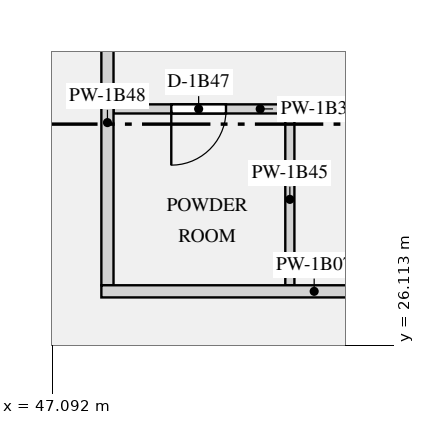
"""IFC4 building model, lengths in metres.
Left out: names, types, materials, properties, quantities, classifications, styles, units other than length and angle.
Written with IfcOpenShell. Run it as: python <this file> out.ifc"""

import sys

from ifc_helpers import new_model, si_unit, direction, frame, frame_2d, origin, place, context, subcontext, project, spatial, rectangle, extrude, element, fill, save


model = new_model("IFC4")
c1 = context("Model", 3, precision=1e-05, world=origin(), true_north=direction((0.0, 1.0)))
c2 = subcontext(c1, "Body", "Model", "MODEL_VIEW")
j1 = project(units=[si_unit("LENGTHUNIT", "METRE"), si_unit("PLANEANGLEUNIT", "RADIAN")], contexts=[c1])
p1 = place(None, origin())
s1 = spatial("IfcSite", under=j1, at=p1, CompositionType="ELEMENT")
p2 = place(p1, origin())
s2 = spatial("IfcBuilding", under=s1, at=p2, CompositionType="ELEMENT")
p3 = place(p2, frame((0.0, 0.0, 28.95)))
s3 = spatial("IfcBuildingStorey", under=s2, at=p3, CompositionType="ELEMENT", Elevation=28.95)
p4 = place(p3, frame((47.9, 27.0, 0.0), z_axis=(0.0, 0.0, 1.0), x_axis=(1.0, 0.0, 0.0)))
e1 = element("IfcWall", 1, at=p4, inside=s3, PredefinedType="PARTITIONING", context=c2, shape_type="SweptSolid", body=[
    extrude(rectangle(XDim=7.0, YDim=0.2, at=frame_2d((3.5, 0.0))), origin(), (0.0, 0.0, 1.0), 2.83),
])
p5 = place(p3, frame((48.1, 30.0, 0.0), z_axis=(0.0, 0.0, 1.0), x_axis=(1.0, 0.0, 0.0)))
e2 = element("IfcWall", 2, at=p5, inside=s3, PredefinedType="PARTITIONING", context=c2, shape_type="SweptSolid", body=[
    extrude(rectangle(XDim=2.975, YDim=0.15, at=frame_2d((1.487, 0.0))), origin(), (0.0, 0.0, 1.0), 2.83),
])
p6 = place(p5, frame((0.95, 0.0, 0.0)))
e3 = element("IfcOpeningElement", 3, at=p6, cuts=e2, PredefinedType="OPENING", context=c2, shape_type="SweptSolid", body=[
    extrude(rectangle(XDim=0.9, YDim=2.1, at=frame_2d((0.45, 1.05))), frame((0.0, 0.085, 0.0), z_axis=(0.0, -1.0, 0.0), x_axis=(1.0, 0.0, 0.0)), (0.0, 0.0, 1.0), 0.17),
])
p7 = place(p3, frame((51.0, 27.1, 0.0), z_axis=(0.0, 0.0, 1.0), x_axis=(0.0, 1.0, 0.0)))
e4 = element("IfcWall", 4, at=p7, inside=s3, PredefinedType="PARTITIONING", context=c2, shape_type="SweptSolid", body=[
    extrude(rectangle(XDim=2.825, YDim=0.15, at=frame_2d((1.413, 0.0))), origin(), (0.0, 0.0, 1.0), 2.83),
])
p8 = place(p3, frame((48.0, 27.1, 0.0), z_axis=(0.0, 0.0, 1.0), x_axis=(0.0, 1.0, 0.0)))
e5 = element("IfcWall", 5, at=p8, inside=s3, PredefinedType="PARTITIONING", context=c2, shape_type="SweptSolid", body=[
    extrude(rectangle(XDim=11.325, YDim=0.2, at=frame_2d((5.663, 0.0))), origin(), (0.0, 0.0, 1.0), 2.83),
])
p9 = place(p8, frame((5.35, 0.0, 0.0)))
e6 = element("IfcOpeningElement", 6, at=p9, cuts=e5, PredefinedType="OPENING", context=c2, shape_type="SweptSolid", body=[
    extrude(rectangle(XDim=1.1, YDim=2.1, at=frame_2d((0.55, 1.05))), frame((0.0, 0.11, 0.0), z_axis=(0.0, -1.0, 0.0), x_axis=(1.0, 0.0, 0.0)), (0.0, 0.0, 1.0), 0.22),
])
p10 = place(p6, frame((0.9, 0.0, 0.0), z_axis=(0.0, 0.0, 1.0), x_axis=(-1.0, 0.0, 0.0)))
e7 = element("IfcDoor", 7, at=p10, inside=s3, OperationType="SINGLE_SWING_RIGHT", PredefinedType="DOOR", context=c2, shape_type="SweptSolid", body=[
    extrude(rectangle(XDim=0.9, YDim=2.1, at=frame_2d((0.45, 1.05))), frame((0.0, 0.025, 0.0), z_axis=(0.0, -1.0, 0.0), x_axis=(1.0, 0.0, 0.0)), (0.0, 0.0, 1.0), 0.05),
])
fill(e3, e7)
save(model, sys.argv[1])
